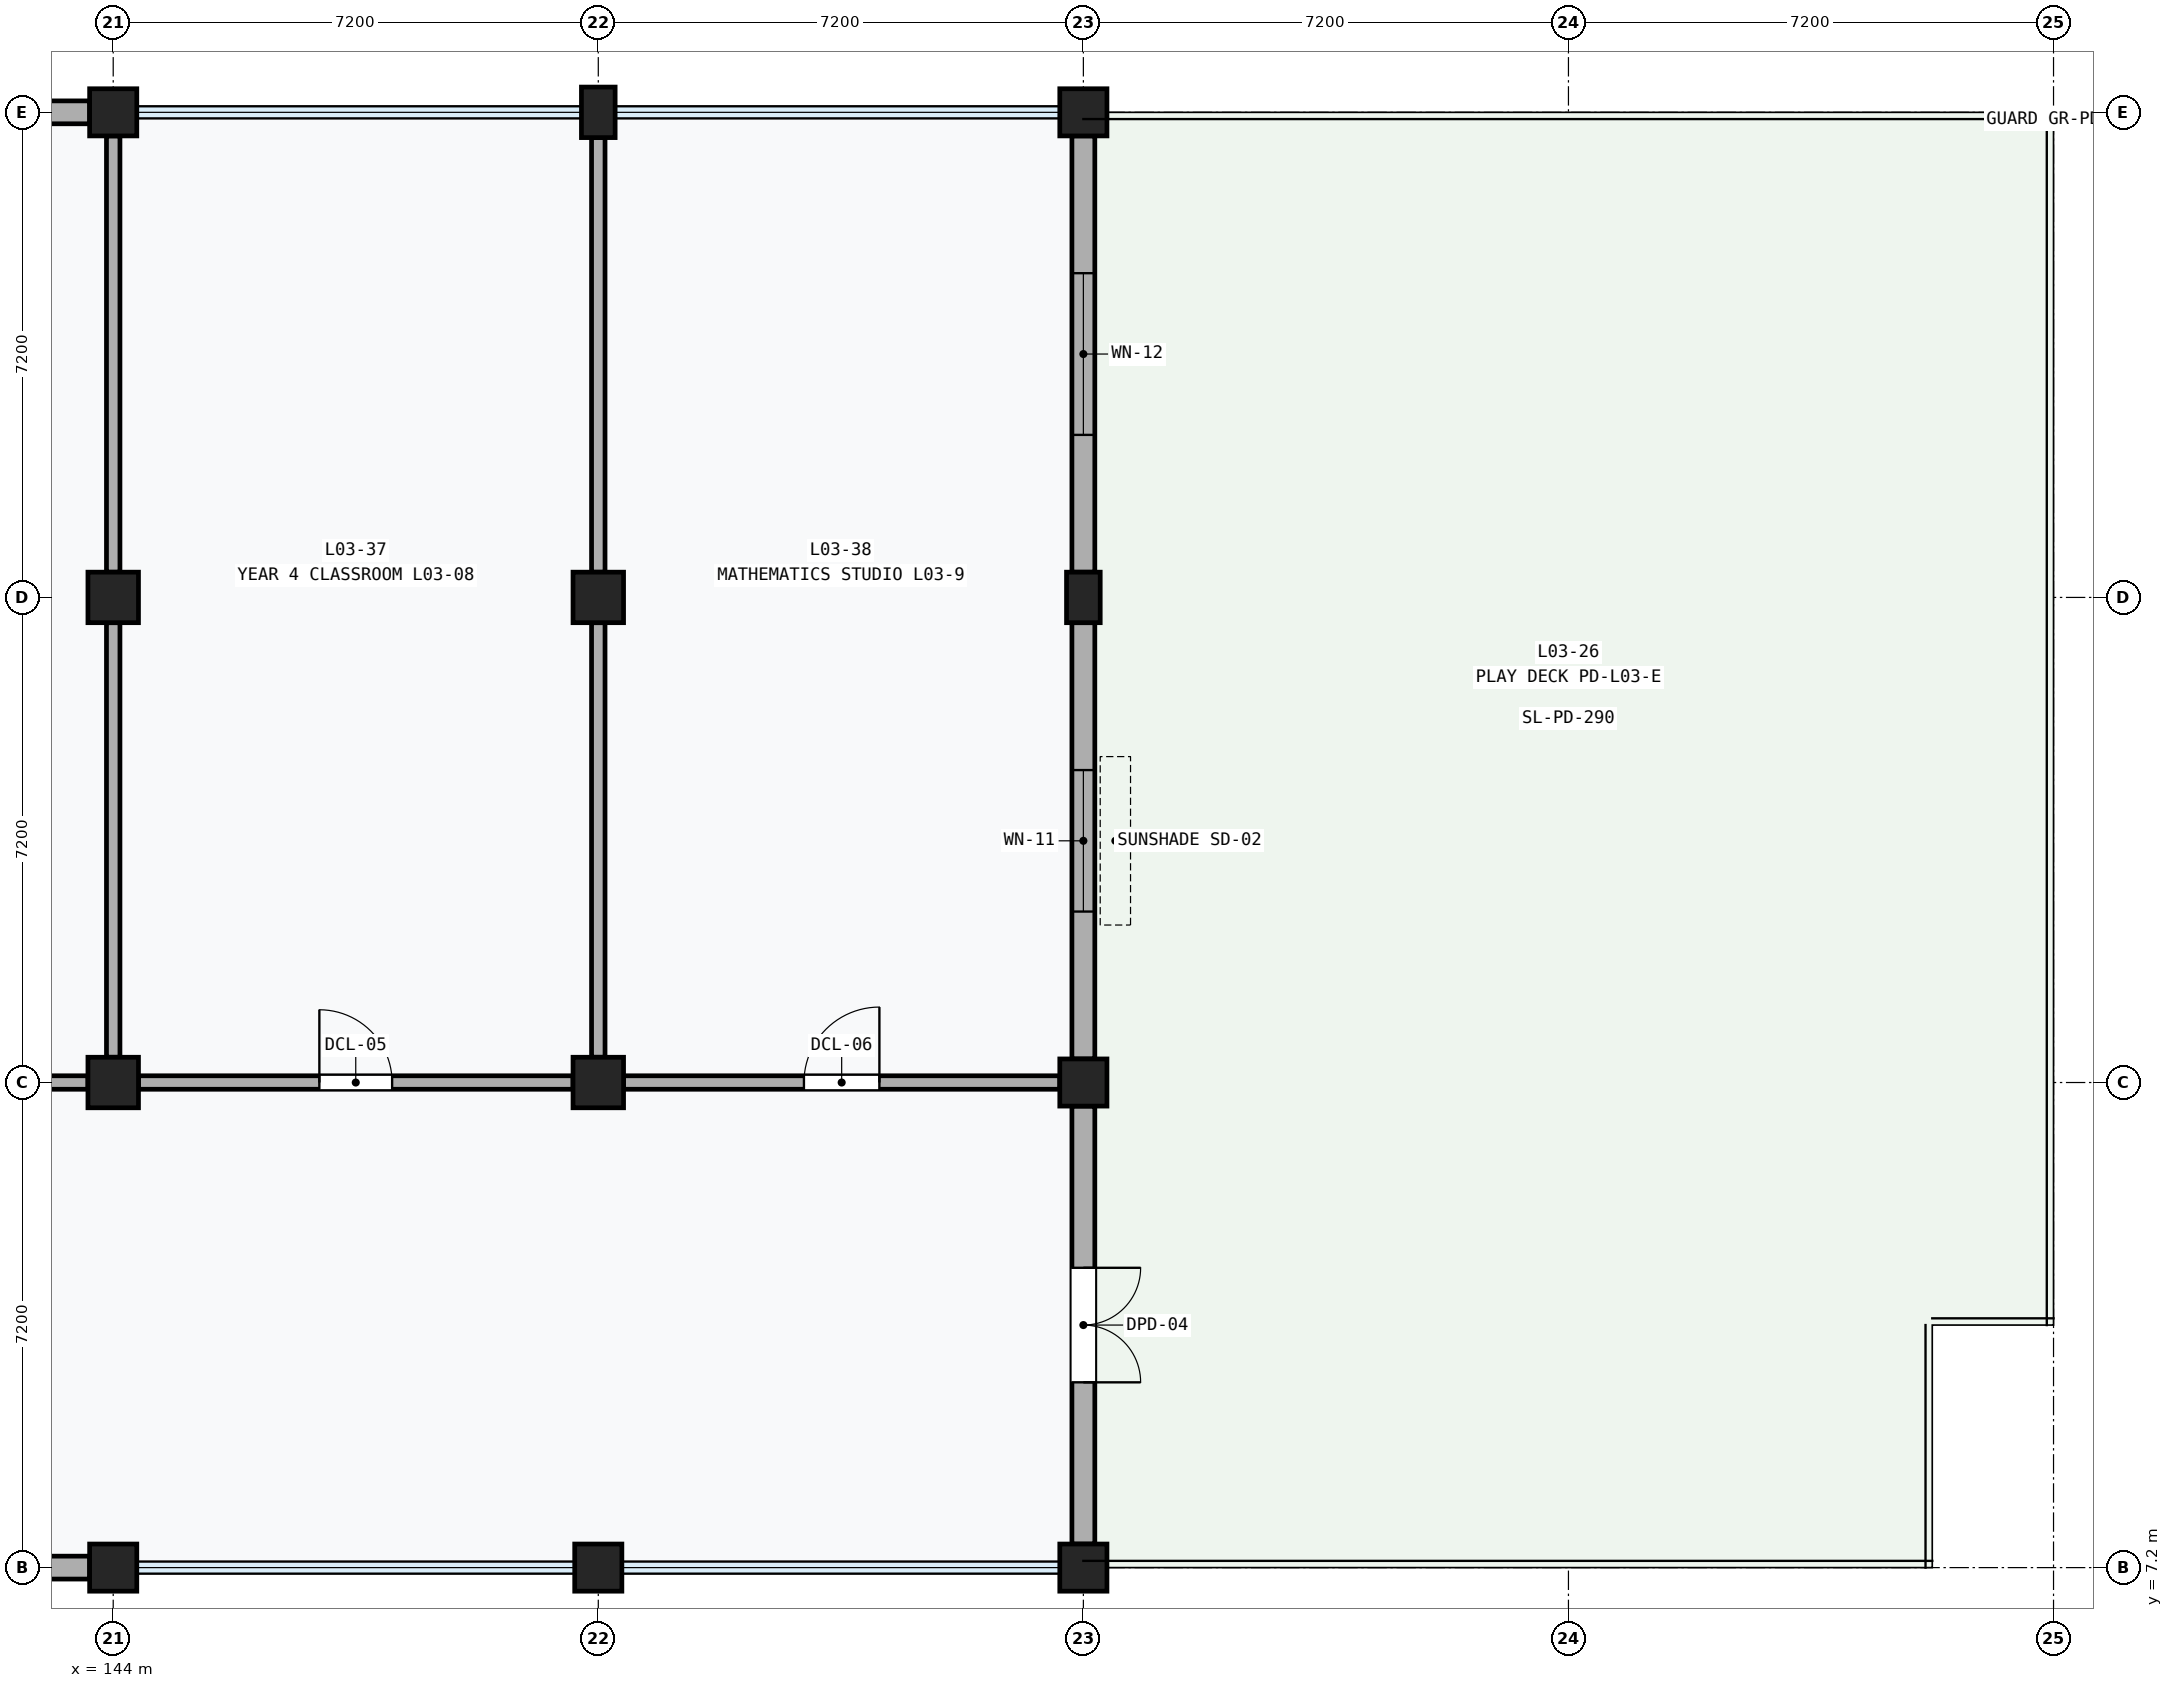
"""IFC4 building model, lengths in metres.
Left out: names, types, materials, properties, quantities, classifications, styles, units other than length and angle.
Written with IfcOpenShell. Run it as: python <this file> out.ifc"""

import sys

from ifc_helpers import new_model, si_unit, direction, frame, frame_2d, origin, origin_2d, place, context, subcontext, project, spatial, rectangle, extrude, element, fill, save


model = new_model("IFC4")
c1 = context("Model", 3, precision=1e-05, world=origin(), true_north=direction((0.0, 1.0)))
c2 = subcontext(c1, "Body", "Model", "MODEL_VIEW")
j1 = project(units=[si_unit("LENGTHUNIT", "METRE"), si_unit("PLANEANGLEUNIT", "RADIAN")], contexts=[c1])
p1 = place(None, origin())
s1 = spatial("IfcSite", under=j1, at=p1, CompositionType="ELEMENT")
p2 = place(p1, origin())
s2 = spatial("IfcBuilding", under=s1, at=p2, CompositionType="ELEMENT")
p3 = place(p2, frame((0.0, 0.0, 14.4)))
s3 = spatial("IfcBuildingStorey", under=s2, at=p3, CompositionType="ELEMENT", Elevation=14.4)
p4 = place(p3, frame((144.0, 7.2, 0.0), z_axis=(0.0, 0.0, 1.0), x_axis=(1.0, 0.0, 0.0)))
e1 = element("IfcColumn", 1, at=p4, inside=s3, PredefinedType="COLUMN", context=c2, shape_type="SweptSolid", body=[
    extrude(rectangle(XDim=0.7, YDim=0.7, at=origin_2d()), origin(), (0.0, 0.0, 1.0), 4.2),
])
for number, where, z_axis, x_axis in (
    (2, (144.0, 14.4, 0.0), (0.0, 0.0, 1.0), (1.0, 0.0, 0.0)),
    (3, (144.0, 21.6, 0.0), (0.0, 0.0, 1.0), (1.0, 0.0, 0.0)),
):
    element("IfcColumn", number, at=place(p3, frame(where, z_axis=z_axis, x_axis=x_axis)), inside=s3, PredefinedType="COLUMN", context=c2, shape_type="SweptSolid", body=[
        extrude(rectangle(XDim=0.75, YDim=0.75, at=origin_2d()), origin(), (0.0, 0.0, 1.0), 4.2),
    ])
for number, where, z_axis, x_axis in (
    (4, (144.0, 28.8, 0.0), (0.0, 0.0, 1.0), (1.0, 0.0, 0.0)),
    (5, (151.2, 7.2, 0.0), (0.0, 0.0, 1.0), (1.0, 0.0, 0.0)),
):
    element("IfcColumn", number, at=place(p3, frame(where, z_axis=z_axis, x_axis=x_axis)), inside=s3, PredefinedType="COLUMN", context=c2, shape_type="SweptSolid", body=[
        extrude(rectangle(XDim=0.7, YDim=0.7, at=origin_2d()), origin(), (0.0, 0.0, 1.0), 4.2),
    ])
for number, where, z_axis, x_axis in (
    (6, (151.2, 14.4, 0.0), (0.0, 0.0, 1.0), (1.0, 0.0, 0.0)),
    (7, (151.2, 21.6, 0.0), (0.0, 0.0, 1.0), (1.0, 0.0, 0.0)),
):
    element("IfcColumn", number, at=place(p3, frame(where, z_axis=z_axis, x_axis=x_axis)), inside=s3, PredefinedType="COLUMN", context=c2, shape_type="SweptSolid", body=[
        extrude(rectangle(XDim=0.75, YDim=0.75, at=origin_2d()), origin(), (0.0, 0.0, 1.0), 4.2),
    ])
p5 = place(p3, frame((151.2, 28.8, 0.0), z_axis=(0.0, 0.0, 1.0), x_axis=(1.0, 0.0, 0.0)))
e8 = element("IfcColumn", 8, at=p5, inside=s3, PredefinedType="PILASTER", context=c2, shape_type="SweptSolid", body=[
    extrude(rectangle(XDim=0.5, YDim=0.75, at=origin_2d()), origin(), (0.0, 0.0, 1.0), 4.2),
])
for number, where, z_axis, x_axis in (
    (9, (158.4, 7.2, 0.0), (0.0, 0.0, 1.0), (1.0, 0.0, 0.0)),
    (10, (158.4, 14.4, 0.0), (0.0, 0.0, 1.0), (1.0, 0.0, 0.0)),
):
    element("IfcColumn", number, at=place(p3, frame(where, z_axis=z_axis, x_axis=x_axis)), inside=s3, PredefinedType="COLUMN", context=c2, shape_type="SweptSolid", body=[
        extrude(rectangle(XDim=0.7, YDim=0.7, at=origin_2d()), origin(), (0.0, 0.0, 1.0), 4.2),
    ])
p6 = place(p3, frame((158.4, 21.6, 0.0), z_axis=(0.0, 0.0, 1.0), x_axis=(1.0, 0.0, 0.0)))
e11 = element("IfcColumn", 11, at=p6, inside=s3, PredefinedType="PILASTER", context=c2, shape_type="SweptSolid", body=[
    extrude(rectangle(XDim=0.5, YDim=0.75, at=origin_2d()), origin(), (0.0, 0.0, 1.0), 4.2),
])
p7 = place(p3, frame((158.4, 28.8, 0.0), z_axis=(0.0, 0.0, 1.0), x_axis=(1.0, 0.0, 0.0)))
e12 = element("IfcColumn", 12, at=p7, inside=s3, PredefinedType="COLUMN", context=c2, shape_type="SweptSolid", body=[
    extrude(rectangle(XDim=0.7, YDim=0.7, at=origin_2d()), origin(), (0.0, 0.0, 1.0), 4.2),
])
p8 = place(p3, frame((137.05, 7.2, 0.0), z_axis=(0.0, 0.0, 1.0), x_axis=(1.0, 0.0, 0.0)))
e13 = element("IfcWall", 13, at=p8, inside=s3, PredefinedType="SOLIDWALL", context=c2, shape_type="SweptSolid", body=[
    extrude(rectangle(XDim=6.6, YDim=0.34, at=frame_2d((3.3, 0.0))), origin(), (0.0, 0.0, 1.0), 3.31),
])
p9 = place(p8, frame((1.8, 0.0, 0.9)))
e14 = element("IfcOpeningElement", 14, at=p9, cuts=e13, PredefinedType="OPENING", context=c2, shape_type="SweptSolid", body=[
    extrude(rectangle(XDim=3.0, YDim=1.8, at=frame_2d((1.5, 0.9))), frame((0.0, 0.182, 0.0), z_axis=(0.0, -1.0, 0.0), x_axis=(1.0, 0.0, 0.0)), (0.0, 0.0, 1.0), 0.364),
])
p10 = place(p3, frame((137.15, 28.8, 0.0), z_axis=(0.0, 0.0, 1.0), x_axis=(1.0, 0.0, 0.0)))
e15 = element("IfcWall", 15, at=p10, inside=s3, PredefinedType="SOLIDWALL", context=c2, shape_type="SweptSolid", body=[
    extrude(rectangle(XDim=6.5, YDim=0.34, at=frame_2d((3.25, 0.0))), origin(), (0.0, 0.0, 1.0), 3.31),
])
p11 = place(p10, frame((2.35, 0.0, 0.85)))
e16 = element("IfcOpeningElement", 16, at=p11, cuts=e15, PredefinedType="OPENING", context=c2, shape_type="SweptSolid", body=[
    extrude(rectangle(XDim=1.8, YDim=2.0, at=frame_2d((0.9, 1.0))), frame((0.0, 0.182, 0.0), z_axis=(0.0, -1.0, 0.0), x_axis=(1.0, 0.0, 0.0)), (0.0, 0.0, 1.0), 0.364),
])
p12 = place(p3, frame((158.4, 7.55, 0.0), z_axis=(0.0, 0.0, 1.0), x_axis=(0.0, 1.0, 0.0)))
e17 = element("IfcWall", 17, at=p12, inside=s3, PredefinedType="SOLIDWALL", context=c2, shape_type="SweptSolid", body=[
    extrude(rectangle(XDim=6.5, YDim=0.34, at=frame_2d((3.25, 0.0))), origin(), (0.0, 0.0, 1.0), 3.31),
])
p13 = place(p12, frame((2.4, 0.0, 0.0)))
e18 = element("IfcOpeningElement", 18, at=p13, cuts=e17, PredefinedType="OPENING", context=c2, shape_type="SweptSolid", body=[
    extrude(rectangle(XDim=1.7, YDim=2.2, at=frame_2d((0.85, 1.1))), frame((0.0, 0.182, 0.0), z_axis=(0.0, -1.0, 0.0), x_axis=(1.0, 0.0, 0.0)), (0.0, 0.0, 1.0), 0.364),
])
p14 = place(p3, frame((158.4, 14.75, 0.0), z_axis=(0.0, 0.0, 1.0), x_axis=(0.0, 1.0, 0.0)))
e19 = element("IfcWall", 19, at=p14, inside=s3, PredefinedType="SOLIDWALL", context=c2, shape_type="SweptSolid", body=[
    extrude(rectangle(XDim=6.475, YDim=0.34, at=frame_2d((3.238, 0.0))), origin(), (0.0, 0.0, 1.0), 3.31),
])
p15 = place(p14, frame((2.188, 0.0, 0.85)))
e20 = element("IfcOpeningElement", 20, at=p15, cuts=e19, PredefinedType="OPENING", context=c2, shape_type="SweptSolid", body=[
    extrude(rectangle(XDim=2.1, YDim=2.0, at=frame_2d((1.05, 1.0))), frame((0.0, 0.182, 0.0), z_axis=(0.0, -1.0, 0.0), x_axis=(1.0, 0.0, 0.0)), (0.0, 0.0, 1.0), 0.364),
])
p16 = place(p3, frame((158.4, 21.975, 0.0), z_axis=(0.0, 0.0, 1.0), x_axis=(0.0, 1.0, 0.0)))
e21 = element("IfcWall", 21, at=p16, inside=s3, PredefinedType="SOLIDWALL", context=c2, shape_type="SweptSolid", body=[
    extrude(rectangle(XDim=6.475, YDim=0.34, at=frame_2d((3.237, 0.0))), origin(), (0.0, 0.0, 1.0), 3.31),
])
p17 = place(p16, frame((2.038, 0.0, 0.85)))
e22 = element("IfcOpeningElement", 22, at=p17, cuts=e21, PredefinedType="OPENING", context=c2, shape_type="SweptSolid", body=[
    extrude(rectangle(XDim=2.4, YDim=2.0, at=frame_2d((1.2, 1.0))), frame((0.0, 0.182, 0.0), z_axis=(0.0, -1.0, 0.0), x_axis=(1.0, 0.0, 0.0)), (0.0, 0.0, 1.0), 0.364),
])
p18 = place(p3, frame((137.175, 14.4, 0.0), z_axis=(0.0, 0.0, 1.0), x_axis=(1.0, 0.0, 0.0)))
e23 = element("IfcWall", 23, at=p18, inside=s3, PredefinedType="PARTITIONING", context=c2, shape_type="SweptSolid", body=[
    extrude(rectangle(XDim=6.45, YDim=0.2, at=frame_2d((3.225, 0.0))), origin(), (0.0, 0.0, 1.0), 3.17),
])
p19 = place(p18, frame((2.695, 0.0, 0.0)))
e24 = element("IfcOpeningElement", 24, at=p19, cuts=e23, PredefinedType="OPENING", context=c2, shape_type="SweptSolid", body=[
    extrude(rectangle(XDim=1.06, YDim=2.16, at=frame_2d((0.53, 1.08))), frame((0.0, 0.112, 0.0), z_axis=(0.0, -1.0, 0.0), x_axis=(1.0, 0.0, 0.0)), (0.0, 0.0, 1.0), 0.224),
])
p20 = place(p3, frame((144.0, 14.775, 0.0), z_axis=(0.0, 0.0, 1.0), x_axis=(0.0, 1.0, 0.0)))
e25 = element("IfcWall", 25, at=p20, inside=s3, PredefinedType="PARTITIONING", context=c2, shape_type="SweptSolid", body=[
    extrude(rectangle(XDim=6.45, YDim=0.2, at=frame_2d((3.225, 0.0))), origin(), (0.0, 0.0, 1.0), 3.17),
])
p21 = place(p3, frame((144.0, 21.975, 0.0), z_axis=(0.0, 0.0, 1.0), x_axis=(0.0, 1.0, 0.0)))
e26 = element("IfcWall", 26, at=p21, inside=s3, PredefinedType="PARTITIONING", context=c2, shape_type="SweptSolid", body=[
    extrude(rectangle(XDim=6.475, YDim=0.2, at=frame_2d((3.237, 0.0))), origin(), (0.0, 0.0, 1.0), 3.17),
])
p22 = place(p3, frame((144.375, 14.4, 0.0), z_axis=(0.0, 0.0, 1.0), x_axis=(1.0, 0.0, 0.0)))
e27 = element("IfcWall", 27, at=p22, inside=s3, PredefinedType="PARTITIONING", context=c2, shape_type="SweptSolid", body=[
    extrude(rectangle(XDim=6.45, YDim=0.2, at=frame_2d((3.225, 0.0))), origin(), (0.0, 0.0, 1.0), 3.17),
])
p23 = place(p22, frame((2.685, 0.0, 0.0)))
e28 = element("IfcOpeningElement", 28, at=p23, cuts=e27, PredefinedType="OPENING", context=c2, shape_type="SweptSolid", body=[
    extrude(rectangle(XDim=1.08, YDim=2.18, at=frame_2d((0.54, 1.09))), frame((0.0, 0.112, 0.0), z_axis=(0.0, -1.0, 0.0), x_axis=(1.0, 0.0, 0.0)), (0.0, 0.0, 1.0), 0.224),
])
p24 = place(p3, frame((151.2, 14.775, 0.0), z_axis=(0.0, 0.0, 1.0), x_axis=(0.0, 1.0, 0.0)))
e29 = element("IfcWall", 29, at=p24, inside=s3, PredefinedType="PARTITIONING", context=c2, shape_type="SweptSolid", body=[
    extrude(rectangle(XDim=6.45, YDim=0.2, at=frame_2d((3.225, 0.0))), origin(), (0.0, 0.0, 1.0), 3.17),
])
p25 = place(p3, frame((151.2, 21.975, 0.0), z_axis=(0.0, 0.0, 1.0), x_axis=(0.0, 1.0, 0.0)))
e30 = element("IfcWall", 30, at=p25, inside=s3, PredefinedType="PARTITIONING", context=c2, shape_type="SweptSolid", body=[
    extrude(rectangle(XDim=6.45, YDim=0.2, at=frame_2d((3.225, 0.0))), origin(), (0.0, 0.0, 1.0), 3.17),
])
p26 = place(p3, frame((151.575, 14.4, 0.0), z_axis=(0.0, 0.0, 1.0), x_axis=(1.0, 0.0, 0.0)))
e31 = element("IfcWall", 31, at=p26, inside=s3, PredefinedType="PARTITIONING", context=c2, shape_type="SweptSolid", body=[
    extrude(rectangle(XDim=6.475, YDim=0.2, at=frame_2d((3.238, 0.0))), origin(), (0.0, 0.0, 1.0), 3.17),
])
p27 = place(p26, frame((2.677, 0.0, 0.0)))
e32 = element("IfcOpeningElement", 32, at=p27, cuts=e31, PredefinedType="OPENING", context=c2, shape_type="SweptSolid", body=[
    extrude(rectangle(XDim=1.12, YDim=2.2, at=frame_2d((0.56, 1.1))), frame((0.0, 0.112, 0.0), z_axis=(0.0, -1.0, 0.0), x_axis=(1.0, 0.0, 0.0)), (0.0, 0.0, 1.0), 0.224),
])
p28 = place(p13, frame((1.7, 0.0, 0.0), z_axis=(0.0, 0.0, 1.0), x_axis=(-1.0, 0.0, 0.0)))
e33 = element("IfcDoor", 33, at=p28, inside=s3, OperationType="DOUBLE_DOOR_SINGLE_SWING", PredefinedType="DOOR", context=c2, shape_type="SweptSolid", body=[
    extrude(rectangle(XDim=1.7, YDim=2.2, at=frame_2d((0.85, 1.1))), frame((0.0, 0.025, 0.0), z_axis=(0.0, -1.0, 0.0), x_axis=(1.0, 0.0, 0.0)), (0.0, 0.0, 1.0), 0.05),
])
fill(e18, e33)
p29 = place(p15, origin())
e34 = element("IfcWindow", 34, at=p29, inside=s3, PartitioningType="SINGLE_PANEL", PredefinedType="WINDOW", context=c2, shape_type="SweptSolid", body=[
    extrude(rectangle(XDim=2.1, YDim=2.0, at=frame_2d((1.05, 1.0))), frame((0.0, 0.03, 0.0), z_axis=(0.0, -1.0, 0.0), x_axis=(1.0, 0.0, 0.0)), (0.0, 0.0, 1.0), 0.06),
])
fill(e20, e34)
p30 = place(p17, origin())
e35 = element("IfcWindow", 35, at=p30, inside=s3, PartitioningType="SINGLE_PANEL", PredefinedType="WINDOW", context=c2, shape_type="SweptSolid", body=[
    extrude(rectangle(XDim=2.4, YDim=2.0, at=frame_2d((1.2, 1.0))), frame((0.0, 0.03, 0.0), z_axis=(0.0, -1.0, 0.0), x_axis=(1.0, 0.0, 0.0)), (0.0, 0.0, 1.0), 0.06),
])
fill(e22, e35)
p31 = place(p23, origin())
e36 = element("IfcDoor", 36, at=p31, inside=s3, OperationType="SINGLE_SWING_LEFT", PredefinedType="DOOR", context=c2, shape_type="SweptSolid", body=[
    extrude(rectangle(XDim=1.08, YDim=2.18, at=frame_2d((0.54, 1.09))), frame((0.0, 0.025, 0.0), z_axis=(0.0, -1.0, 0.0), x_axis=(1.0, 0.0, 0.0)), (0.0, 0.0, 1.0), 0.05),
])
fill(e28, e36)
p32 = place(p27, origin())
e37 = element("IfcDoor", 37, at=p32, inside=s3, OperationType="SINGLE_SWING_RIGHT", PredefinedType="DOOR", context=c2, shape_type="SweptSolid", body=[
    extrude(rectangle(XDim=1.12, YDim=2.2, at=frame_2d((0.56, 1.1))), frame((0.0, 0.025, 0.0), z_axis=(0.0, -1.0, 0.0), x_axis=(1.0, 0.0, 0.0)), (0.0, 0.0, 1.0), 0.05),
])
fill(e32, e37)
save(model, sys.argv[1])
